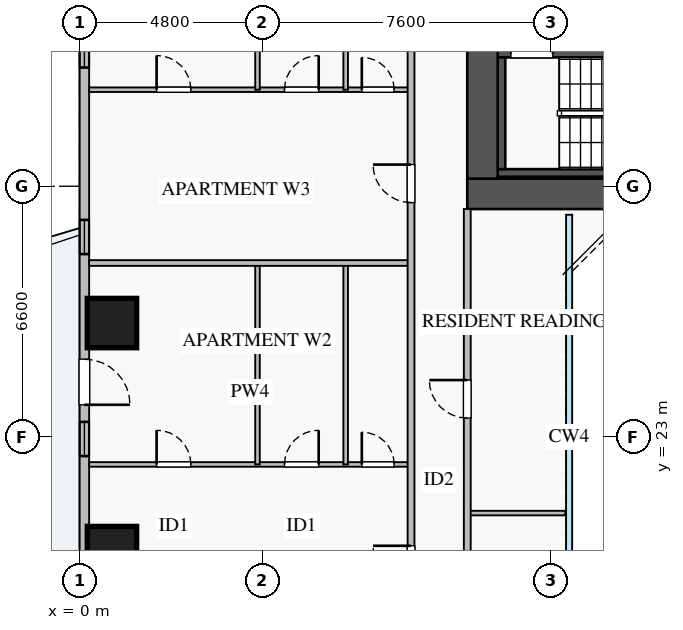
"""IFC4 building model, lengths in metres.
Left out: names, types, materials, properties, quantities, classifications, styles, units other than length and angle.
Written with IfcOpenShell. Run it as: python <this file> out.ifc"""

import sys

from ifc_helpers import new_model, si_unit, direction, frame, frame_2d, origin, origin_2d, place, context, subcontext, project, spatial, rectangle, extrude, source, transform, mapped, element, fill, save


model = new_model("IFC4")
c1 = context("Model", 3, precision=1e-05, world=origin(), true_north=direction((0.0, 1.0)))
c2 = subcontext(c1, "Body", "Model", "MODEL_VIEW")
j1 = project(units=[si_unit("LENGTHUNIT", "METRE"), si_unit("PLANEANGLEUNIT", "RADIAN")], contexts=[c1])
p1 = place(None, origin())
s1 = spatial("IfcSite", under=j1, at=p1, CompositionType="ELEMENT")
p2 = place(p1, origin())
s2 = spatial("IfcBuilding", under=s1, at=p2, CompositionType="ELEMENT")
p3 = place(p2, frame((0.0, 0.0, 39.25)))
s3 = spatial("IfcBuildingStorey", under=s2, at=p3, CompositionType="ELEMENT", Elevation=39.25)
p4 = place(p3, frame((12.68, 33.2, 0.0), z_axis=(0.0, 0.0, 1.0), x_axis=(1.0, 0.0, 0.0)))
e1 = element("IfcWall", 1, at=p4, inside=s3, PredefinedType="SHEAR", context=c2, shape_type="SweptSolid", body=[
    extrude(rectangle(XDim=1.94, YDim=0.18, at=frame_2d((0.97, 0.0))), origin(), (0.0, 0.0, 1.0), 3.07),
])
p5 = place(p3, frame((11.0, 29.95, 0.0), z_axis=(0.0, 0.0, 1.0), x_axis=(1.0, 0.0, 0.0)))
e2 = element("IfcWall", 2, at=p5, inside=s3, PredefinedType="SHEAR", context=c2, shape_type="SweptSolid", body=[
    extrude(rectangle(XDim=7.15, YDim=0.2, at=frame_2d((3.575, 0.0))), origin(), (0.0, 0.0, 1.0), 3.25),
])
p6 = place(p3, frame((11.0, 33.09, 0.0), z_axis=(0.0, 0.0, 1.0), x_axis=(1.0, 0.0, 0.0)))
e3 = element("IfcWall", 3, at=p6, inside=s3, PredefinedType="SHEAR", context=c2, shape_type="SweptSolid", body=[
    extrude(rectangle(XDim=7.15, YDim=0.2, at=frame_2d((3.575, 0.0))), origin(), (0.0, 0.0, 1.0), 3.25),
])
p7 = place(p6, frame((0.35, 0.0, 0.0)))
e4 = element("IfcOpeningElement", 4, at=p7, cuts=e3, PredefinedType="OPENING", context=c2, shape_type="SweptSolid", body=[
    extrude(rectangle(XDim=1.1, YDim=2.05, at=frame_2d((0.55, 1.025))), frame((0.0, 0.11, 0.0), z_axis=(0.0, -1.0, 0.0), x_axis=(1.0, 0.0, 0.0)), (0.0, 0.0, 1.0), 0.22),
])
p8 = place(p3, frame((11.1, 30.05, 0.0), z_axis=(0.0, 0.0, 1.0), x_axis=(0.0, 1.0, 0.0)))
e5 = element("IfcWall", 5, at=p8, inside=s3, PredefinedType="SHEAR", context=c2, shape_type="SweptSolid", body=[
    extrude(rectangle(XDim=2.94, YDim=0.2, at=frame_2d((1.47, 0.0))), origin(), (0.0, 0.0, 1.0), 3.25),
])
p9 = place(p3, frame((10.2, 29.4, 0.0), z_axis=(0.0, 0.0, 1.0), x_axis=(1.0, 0.0, 0.0)))
e6 = element("IfcWall", 6, at=p9, inside=s3, PredefinedType="SHEAR", context=c2, shape_type="SweptSolid", body=[
    extrude(rectangle(XDim=17.6, YDim=0.8, at=frame_2d((8.8, 0.0))), origin(), (0.0, 0.0, 1.0), 3.25),
])
p10 = place(p3, frame((10.6, 29.8, 0.0), z_axis=(0.0, 0.0, 1.0), x_axis=(0.0, 1.0, 0.0)))
e7 = element("IfcWall", 7, at=p10, inside=s3, PredefinedType="SHEAR", context=c2, shape_type="SweptSolid", body=[
    extrude(rectangle(XDim=5.6, YDim=0.8, at=frame_2d((2.8, 0.0))), origin(), (0.0, 0.0, 1.0), 3.25),
])
m1 = source(origin(), c2, "Body", "SweptSolid", [
    extrude(rectangle(XDim=1.3, YDim=1.3, at=origin_2d()), origin(), (0.0, 0.0, 1.0), 3.25),
])
for number, where, z_axis, x_axis in (
    (8, (0.85, 26.0, 0.0), (0.0, 0.0, 1.0), (1.0, 0.0, 0.0)),
    (9, (0.85, 20.0, 0.0), (0.0, 0.0, 1.0), (1.0, 0.0, 0.0)),
):
    element("IfcColumn", number, at=place(p3, frame(where, z_axis=z_axis, x_axis=x_axis)), inside=s3, PredefinedType="COLUMN", context=c2, shape_type="MappedRepresentation", body=[
        mapped(m1, transform((0.0, 0.0, 0.0), x_axis=(1.0, 0.0, 0.0), y_axis=(0.0, 1.0, 0.0), z_axis=(0.0, 0.0, 1.0), scale=1.0)),
    ])
p11 = place(p3, frame((0.125, 9.45, 0.0), z_axis=(0.0, 0.0, 1.0), x_axis=(0.0, 1.0, 0.0)))
e10 = element("IfcWall", 10, at=p11, inside=s3, PredefinedType="STANDARD", context=c2, shape_type="SweptSolid", body=[
    extrude(rectangle(XDim=27.1, YDim=0.25, at=frame_2d((13.55, 0.0))), origin(), (0.0, 0.0, 1.0), 2.61),
])
p12 = place(p11, frame((14.4, 0.0, 0.0)))
e11 = element("IfcOpeningElement", 11, at=p12, cuts=e10, PredefinedType="OPENING", context=c2, shape_type="SweptSolid", body=[
    extrude(rectangle(XDim=1.2, YDim=2.1, at=frame_2d((0.6, 1.05))), frame((0.0, 0.135, 0.0), z_axis=(0.0, -1.0, 0.0), x_axis=(1.0, 0.0, 0.0)), (0.0, 0.0, 1.0), 0.27),
])
p13 = place(p11, frame((2.188, 0.0, 0.9)))
e12 = element("IfcOpeningElement", 12, at=p13, cuts=e10, PredefinedType="OPENING", context=c2, shape_type="SweptSolid", body=[
    extrude(rectangle(XDim=2.4, YDim=1.48, at=frame_2d((1.2, 0.74))), frame((0.0, 0.135, 0.0), z_axis=(0.0, -1.0, 0.0), x_axis=(1.0, 0.0, 0.0)), (0.0, 0.0, 1.0), 0.27),
])
p14 = place(p11, frame((23.272, 0.0, 0.9)))
e13 = element("IfcOpeningElement", 13, at=p14, cuts=e10, PredefinedType="OPENING", context=c2, shape_type="SweptSolid", body=[
    extrude(rectangle(XDim=2.1, YDim=1.5, at=frame_2d((1.05, 0.75))), frame((0.0, 0.135, 0.0), z_axis=(0.0, -1.0, 0.0), x_axis=(1.0, 0.0, 0.0)), (0.0, 0.0, 1.0), 0.27),
])
p15 = place(p11, frame((13.05, 0.0, 0.9)))
e14 = element("IfcOpeningElement", 14, at=p15, cuts=e10, PredefinedType="OPENING", context=c2, shape_type="SweptSolid", body=[
    extrude(rectangle(XDim=0.9, YDim=1.2, at=frame_2d((0.45, 0.6))), frame((0.0, 0.135, 0.0), z_axis=(0.0, -1.0, 0.0), x_axis=(1.0, 0.0, 0.0)), (0.0, 0.0, 1.0), 0.27),
])
p16 = place(p11, frame((8.165, 0.0, 0.9)))
e15 = element("IfcOpeningElement", 15, at=p16, cuts=e10, PredefinedType="OPENING", context=c2, shape_type="SweptSolid", body=[
    extrude(rectangle(XDim=0.9, YDim=1.2, at=frame_2d((0.45, 0.6))), frame((0.0, 0.135, 0.0), z_axis=(0.0, -1.0, 0.0), x_axis=(1.0, 0.0, 0.0)), (0.0, 0.0, 1.0), 0.27),
])
p17 = place(p11, frame((18.365, 0.0, 0.9)))
e16 = element("IfcOpeningElement", 16, at=p17, cuts=e10, PredefinedType="OPENING", context=c2, shape_type="SweptSolid", body=[
    extrude(rectangle(XDim=0.9, YDim=1.2, at=frame_2d((0.45, 0.6))), frame((0.0, 0.135, 0.0), z_axis=(0.0, -1.0, 0.0), x_axis=(1.0, 0.0, 0.0)), (0.0, 0.0, 1.0), 0.27),
])
p18 = place(p3, frame((0.25, 22.28, 0.0), z_axis=(0.0, 0.0, 1.0), x_axis=(1.0, 0.0, 0.0)))
e17 = element("IfcWall", 17, at=p18, inside=s3, PredefinedType="PLUMBINGWALL", context=c2, shape_type="SweptSolid", body=[
    extrude(rectangle(XDim=8.47, YDim=0.12, at=frame_2d((4.235, 0.0))), origin(), (0.0, 0.0, 1.0), 3.07),
])
p19 = place(p18, frame((1.775, 0.0, 0.0)))
e18 = element("IfcOpeningElement", 18, at=p19, cuts=e17, PredefinedType="OPENING", context=c2, shape_type="SweptSolid", body=[
    extrude(rectangle(XDim=0.9, YDim=2.05, at=frame_2d((0.45, 1.025))), frame((0.0, 0.07, 0.0), z_axis=(0.0, -1.0, 0.0), x_axis=(1.0, 0.0, 0.0)), (0.0, 0.0, 1.0), 0.14),
])
p20 = place(p18, frame((5.14, 0.0, 0.0)))
e19 = element("IfcOpeningElement", 19, at=p20, cuts=e17, PredefinedType="OPENING", context=c2, shape_type="SweptSolid", body=[
    extrude(rectangle(XDim=0.9, YDim=2.05, at=frame_2d((0.45, 1.025))), frame((0.0, 0.07, 0.0), z_axis=(0.0, -1.0, 0.0), x_axis=(1.0, 0.0, 0.0)), (0.0, 0.0, 1.0), 0.14),
])
p21 = place(p18, frame((7.175, 0.0, 0.0)))
e20 = element("IfcOpeningElement", 20, at=p21, cuts=e17, PredefinedType="OPENING", context=c2, shape_type="SweptSolid", body=[
    extrude(rectangle(XDim=0.85, YDim=2.05, at=frame_2d((0.425, 1.025))), frame((0.0, 0.07, 0.0), z_axis=(0.0, -1.0, 0.0), x_axis=(1.0, 0.0, 0.0)), (0.0, 0.0, 1.0), 0.14),
])
for number, where, z_axis, x_axis in (
    (21, (4.68, 22.28, 0.0), (0.0, 0.0, 1.0), (0.0, 1.0, 0.0)),
    (22, (7.0, 22.28, 0.0), (0.0, 0.0, 1.0), (0.0, 1.0, 0.0)),
):
    element("IfcWall", number, at=place(p3, frame(where, z_axis=z_axis, x_axis=x_axis)), inside=s3, PredefinedType="PLUMBINGWALL", context=c2, shape_type="SweptSolid", body=[
        extrude(rectangle(XDim=5.3, YDim=0.12, at=frame_2d((2.65, 0.0))), origin(), (0.0, 0.0, 1.0), 3.07),
    ])
p22 = place(p3, frame((0.25, 32.14, 0.0), z_axis=(0.0, 0.0, 1.0), x_axis=(1.0, 0.0, 0.0)))
e23 = element("IfcWall", 23, at=p22, inside=s3, PredefinedType="PLUMBINGWALL", context=c2, shape_type="SweptSolid", body=[
    extrude(rectangle(XDim=8.47, YDim=0.12, at=frame_2d((4.235, 0.0))), origin(), (0.0, 0.0, 1.0), 3.07),
])
p23 = place(p22, frame((1.775, 0.0, 0.0)))
e24 = element("IfcOpeningElement", 24, at=p23, cuts=e23, PredefinedType="OPENING", context=c2, shape_type="SweptSolid", body=[
    extrude(rectangle(XDim=0.9, YDim=2.05, at=frame_2d((0.45, 1.025))), frame((0.0, 0.07, 0.0), z_axis=(0.0, -1.0, 0.0), x_axis=(1.0, 0.0, 0.0)), (0.0, 0.0, 1.0), 0.14),
])
p24 = place(p22, frame((5.14, 0.0, 0.0)))
e25 = element("IfcOpeningElement", 25, at=p24, cuts=e23, PredefinedType="OPENING", context=c2, shape_type="SweptSolid", body=[
    extrude(rectangle(XDim=0.9, YDim=2.05, at=frame_2d((0.45, 1.025))), frame((0.0, 0.07, 0.0), z_axis=(0.0, -1.0, 0.0), x_axis=(1.0, 0.0, 0.0)), (0.0, 0.0, 1.0), 0.14),
])
p25 = place(p22, frame((7.175, 0.0, 0.0)))
e26 = element("IfcOpeningElement", 26, at=p25, cuts=e23, PredefinedType="OPENING", context=c2, shape_type="SweptSolid", body=[
    extrude(rectangle(XDim=0.85, YDim=2.05, at=frame_2d((0.425, 1.025))), frame((0.0, 0.07, 0.0), z_axis=(0.0, -1.0, 0.0), x_axis=(1.0, 0.0, 0.0)), (0.0, 0.0, 1.0), 0.14),
])
for number, where, z_axis, x_axis in (
    (27, (4.68, 32.14, 0.0), (0.0, 0.0, 1.0), (0.0, 1.0, 0.0)),
    (28, (7.0, 32.14, 0.0), (0.0, 0.0, 1.0), (0.0, 1.0, 0.0)),
):
    element("IfcWall", number, at=place(p3, frame(where, z_axis=z_axis, x_axis=x_axis)), inside=s3, PredefinedType="PLUMBINGWALL", context=c2, shape_type="SweptSolid", body=[
        extrude(rectangle(XDim=4.94, YDim=0.12, at=frame_2d((2.47, 0.0))), origin(), (0.0, 0.0, 1.0), 3.07),
    ])
p26 = place(p3, frame((0.25, 27.58, 0.0), z_axis=(0.0, 0.0, 1.0), x_axis=(1.0, 0.0, 0.0)))
e29 = element("IfcWall", 29, at=p26, inside=s3, PredefinedType="PARTITIONING", context=c2, shape_type="SweptSolid", body=[
    extrude(rectangle(XDim=8.47, YDim=0.15, at=frame_2d((4.235, 0.0))), origin(), (0.0, 0.0, 1.0), 3.07),
])
p27 = place(p3, frame((8.72, 7.21, 0.0), z_axis=(0.0, 0.0, 1.0), x_axis=(0.0, 1.0, 0.0)))
e30 = element("IfcWall", 30, at=p27, inside=s3, PredefinedType="PARTITIONING", context=c2, shape_type="SweptSolid", body=[
    extrude(rectangle(XDim=31.23, YDim=0.18, at=frame_2d((15.615, 0.0))), origin(), (0.0, 0.0, 1.0), 3.07),
])
p28 = place(p27, frame((30.09, 0.0, 0.0)))
e31 = element("IfcOpeningElement", 31, at=p28, cuts=e30, PredefinedType="OPENING", context=c2, shape_type="SweptSolid", body=[
    extrude(rectangle(XDim=0.9, YDim=2.05, at=frame_2d((0.45, 1.025))), frame((0.0, 0.1, 0.0), z_axis=(0.0, -1.0, 0.0), x_axis=(1.0, 0.0, 0.0)), (0.0, 0.0, 1.0), 0.2),
])
p29 = place(p27, frame((0.24, 0.0, 0.0)))
e32 = element("IfcOpeningElement", 32, at=p29, cuts=e30, PredefinedType="OPENING", context=c2, shape_type="SweptSolid", body=[
    extrude(rectangle(XDim=0.9, YDim=2.05, at=frame_2d((0.45, 1.025))), frame((0.0, 0.1, 0.0), z_axis=(0.0, -1.0, 0.0), x_axis=(1.0, 0.0, 0.0)), (0.0, 0.0, 1.0), 0.2),
])
p30 = place(p27, frame((5.265, 0.0, 0.0)))
e33 = element("IfcOpeningElement", 33, at=p30, cuts=e30, PredefinedType="OPENING", context=c2, shape_type="SweptSolid", body=[
    extrude(rectangle(XDim=1.0, YDim=2.05, at=frame_2d((0.5, 1.025))), frame((0.0, 0.1, 0.0), z_axis=(0.0, -1.0, 0.0), x_axis=(1.0, 0.0, 0.0)), (0.0, 0.0, 1.0), 0.2),
])
p31 = place(p27, frame((11.93, 0.0, 0.0)))
e34 = element("IfcOpeningElement", 34, at=p31, cuts=e30, PredefinedType="OPENING", context=c2, shape_type="SweptSolid", body=[
    extrude(rectangle(XDim=1.0, YDim=2.05, at=frame_2d((0.5, 1.025))), frame((0.0, 0.1, 0.0), z_axis=(0.0, -1.0, 0.0), x_axis=(1.0, 0.0, 0.0)), (0.0, 0.0, 1.0), 0.2),
])
p32 = place(p27, frame((21.96, 0.0, 0.0)))
e35 = element("IfcOpeningElement", 35, at=p32, cuts=e30, PredefinedType="OPENING", context=c2, shape_type="SweptSolid", body=[
    extrude(rectangle(XDim=1.0, YDim=2.05, at=frame_2d((0.5, 1.025))), frame((0.0, 0.1, 0.0), z_axis=(0.0, -1.0, 0.0), x_axis=(1.0, 0.0, 0.0)), (0.0, 0.0, 1.0), 0.2),
])
p33 = place(p3, frame((10.2, 21.0, 0.0), z_axis=(0.0, 0.0, 1.0), x_axis=(1.0, 0.0, 0.0)))
e36 = element("IfcWall", 36, at=p33, inside=s3, PredefinedType="PLUMBINGWALL", context=c2, shape_type="SweptSolid", body=[
    extrude(rectangle(XDim=2.58, YDim=0.12, at=frame_2d((1.29, 0.0))), origin(), (0.0, 0.0, 1.0), 3.07),
])
p34 = place(p3, frame((10.2, 17.0, 0.0), z_axis=(0.0, 0.0, 1.0), x_axis=(0.0, 1.0, 0.0)))
e37 = element("IfcWall", 37, at=p34, inside=s3, PredefinedType="PARTITIONING", context=c2, shape_type="SweptSolid", body=[
    extrude(rectangle(XDim=12.0, YDim=0.18, at=frame_2d((6.0, 0.0))), origin(), (0.0, 0.0, 1.0), 3.07),
])
p35 = place(p34, frame((1.5, 0.0, 0.0)))
e38 = element("IfcOpeningElement", 38, at=p35, cuts=e37, PredefinedType="OPENING", context=c2, shape_type="SweptSolid", body=[
    extrude(rectangle(XDim=0.85, YDim=2.05, at=frame_2d((0.425, 1.025))), frame((0.0, 0.1, 0.0), z_axis=(0.0, -1.0, 0.0), x_axis=(1.0, 0.0, 0.0)), (0.0, 0.0, 1.0), 0.2),
])
p36 = place(p34, frame((6.5, 0.0, 0.0)))
e39 = element("IfcOpeningElement", 39, at=p36, cuts=e37, PredefinedType="OPENING", context=c2, shape_type="SweptSolid", body=[
    extrude(rectangle(XDim=1.0, YDim=2.05, at=frame_2d((0.5, 1.025))), frame((0.0, 0.1, 0.0), z_axis=(0.0, -1.0, 0.0), x_axis=(1.0, 0.0, 0.0)), (0.0, 0.0, 1.0), 0.2),
])
m2 = source(origin(), c2, "Body", "SweptSolid", [
    extrude(rectangle(XDim=1.2, YDim=2.1, at=frame_2d((0.6, 1.05))), frame((0.0, 0.025, 0.0), z_axis=(0.0, -1.0, 0.0), x_axis=(1.0, 0.0, 0.0)), (0.0, 0.0, 1.0), 0.05),
])
p37 = place(p12, frame((1.2, 0.0, 0.0), z_axis=(0.0, 0.0, 1.0), x_axis=(-1.0, 0.0, 0.0)))
e40 = element("IfcDoor", 40, at=p37, inside=s3, OperationType="SINGLE_SWING_LEFT", PredefinedType="DOOR", context=c2, shape_type="MappedRepresentation", body=[
    mapped(m2, transform((0.0, 0.0, 0.0), x_axis=(1.0, 0.0, 0.0), y_axis=(0.0, 1.0, 0.0), z_axis=(0.0, 0.0, 1.0), scale=1.0)),
])
fill(e11, e40)
m3 = source(origin(), c2, "Body", "SweptSolid", [
    extrude(rectangle(XDim=2.1, YDim=1.5, at=frame_2d((1.05, 0.75))), frame((0.0, 0.03, 0.0), z_axis=(0.0, -1.0, 0.0), x_axis=(1.0, 0.0, 0.0)), (0.0, 0.0, 1.0), 0.06),
])
p38 = place(p14, origin())
e41 = element("IfcWindow", 41, at=p38, inside=s3, PartitioningType="TRIPLE_PANEL_VERTICAL", PredefinedType="WINDOW", context=c2, shape_type="MappedRepresentation", body=[
    mapped(m3, transform((0.0, 0.0, 0.0), x_axis=(1.0, 0.0, 0.0), y_axis=(0.0, 1.0, 0.0), z_axis=(0.0, 0.0, 1.0), scale=1.0)),
])
fill(e13, e41)
m4 = source(origin(), c2, "Body", "SweptSolid", [
    extrude(rectangle(XDim=1.1, YDim=2.05, at=frame_2d((0.55, 1.025))), frame((0.0, 0.025, 0.0), z_axis=(0.0, -1.0, 0.0), x_axis=(1.0, 0.0, 0.0)), (0.0, 0.0, 1.0), 0.05),
])
p39 = place(p7, origin())
e42 = element("IfcDoor", 42, at=p39, inside=s3, OperationType="SINGLE_SWING_RIGHT", PredefinedType="DOOR", context=c2, shape_type="MappedRepresentation", body=[
    mapped(m4, transform((0.0, 0.0, 0.0), x_axis=(1.0, 0.0, 0.0), y_axis=(0.0, 1.0, 0.0), z_axis=(0.0, 0.0, 1.0), scale=1.0)),
])
fill(e4, e42)
m5 = source(origin(), c2, "Body", "SweptSolid", [
    extrude(rectangle(XDim=0.9, YDim=2.05, at=frame_2d((0.45, 1.025))), frame((0.0, 0.025, 0.0), z_axis=(0.0, -1.0, 0.0), x_axis=(1.0, 0.0, 0.0)), (0.0, 0.0, 1.0), 0.05),
])
p40 = place(p19, origin())
e43 = element("IfcDoor", 43, at=p40, inside=s3, OperationType="SINGLE_SWING_LEFT", PredefinedType="DOOR", context=c2, shape_type="MappedRepresentation", body=[
    mapped(m5, transform((0.0, 0.0, 0.0), x_axis=(1.0, 0.0, 0.0), y_axis=(0.0, 1.0, 0.0), z_axis=(0.0, 0.0, 1.0), scale=1.0)),
])
fill(e18, e43)
p41 = place(p20, origin())
e44 = element("IfcDoor", 44, at=p41, inside=s3, OperationType="SINGLE_SWING_RIGHT", PredefinedType="DOOR", context=c2, shape_type="MappedRepresentation", body=[
    mapped(m5, transform((0.0, 0.0, 0.0), x_axis=(1.0, 0.0, 0.0), y_axis=(0.0, 1.0, 0.0), z_axis=(0.0, 0.0, 1.0), scale=1.0)),
])
fill(e19, e44)
m6 = source(origin(), c2, "Body", "SweptSolid", [
    extrude(rectangle(XDim=0.85, YDim=2.05, at=frame_2d((0.425, 1.025))), frame((0.0, 0.025, 0.0), z_axis=(0.0, -1.0, 0.0), x_axis=(1.0, 0.0, 0.0)), (0.0, 0.0, 1.0), 0.05),
])
p42 = place(p21, origin())
e45 = element("IfcDoor", 45, at=p42, inside=s3, OperationType="SINGLE_SWING_LEFT", PredefinedType="DOOR", context=c2, shape_type="MappedRepresentation", body=[
    mapped(m6, transform((0.0, 0.0, 0.0), x_axis=(1.0, 0.0, 0.0), y_axis=(0.0, 1.0, 0.0), z_axis=(0.0, 0.0, 1.0), scale=1.0)),
])
fill(e20, e45)
p43 = place(p23, origin())
e46 = element("IfcDoor", 46, at=p43, inside=s3, OperationType="SINGLE_SWING_LEFT", PredefinedType="DOOR", context=c2, shape_type="MappedRepresentation", body=[
    mapped(m5, transform((0.0, 0.0, 0.0), x_axis=(1.0, 0.0, 0.0), y_axis=(0.0, 1.0, 0.0), z_axis=(0.0, 0.0, 1.0), scale=1.0)),
])
fill(e24, e46)
p44 = place(p24, origin())
e47 = element("IfcDoor", 47, at=p44, inside=s3, OperationType="SINGLE_SWING_RIGHT", PredefinedType="DOOR", context=c2, shape_type="MappedRepresentation", body=[
    mapped(m5, transform((0.0, 0.0, 0.0), x_axis=(1.0, 0.0, 0.0), y_axis=(0.0, 1.0, 0.0), z_axis=(0.0, 0.0, 1.0), scale=1.0)),
])
fill(e25, e47)
p45 = place(p25, origin())
e48 = element("IfcDoor", 48, at=p45, inside=s3, OperationType="SINGLE_SWING_LEFT", PredefinedType="DOOR", context=c2, shape_type="MappedRepresentation", body=[
    mapped(m6, transform((0.0, 0.0, 0.0), x_axis=(1.0, 0.0, 0.0), y_axis=(0.0, 1.0, 0.0), z_axis=(0.0, 0.0, 1.0), scale=1.0)),
])
fill(e26, e48)
m7 = source(origin(), c2, "Body", "SweptSolid", [
    extrude(rectangle(XDim=1.0, YDim=2.05, at=frame_2d((0.5, 1.025))), frame((0.0, 0.025, 0.0), z_axis=(0.0, -1.0, 0.0), x_axis=(1.0, 0.0, 0.0)), (0.0, 0.0, 1.0), 0.05),
])
p46 = place(p31, origin())
e49 = element("IfcDoor", 49, at=p46, inside=s3, OperationType="SINGLE_SWING_RIGHT", PredefinedType="DOOR", context=c2, shape_type="MappedRepresentation", body=[
    mapped(m7, transform((0.0, 0.0, 0.0), x_axis=(1.0, 0.0, 0.0), y_axis=(0.0, 1.0, 0.0), z_axis=(0.0, 0.0, 1.0), scale=1.0)),
])
fill(e34, e49)
p47 = place(p32, origin())
e50 = element("IfcDoor", 50, at=p47, inside=s3, OperationType="SINGLE_SWING_RIGHT", PredefinedType="DOOR", context=c2, shape_type="MappedRepresentation", body=[
    mapped(m7, transform((0.0, 0.0, 0.0), x_axis=(1.0, 0.0, 0.0), y_axis=(0.0, 1.0, 0.0), z_axis=(0.0, 0.0, 1.0), scale=1.0)),
])
fill(e35, e50)
p48 = place(p36, origin())
e51 = element("IfcDoor", 51, at=p48, inside=s3, OperationType="SINGLE_SWING_RIGHT", PredefinedType="DOOR", context=c2, shape_type="MappedRepresentation", body=[
    mapped(m7, transform((0.0, 0.0, 0.0), x_axis=(1.0, 0.0, 0.0), y_axis=(0.0, 1.0, 0.0), z_axis=(0.0, 0.0, 1.0), scale=1.0)),
])
fill(e39, e51)
m8 = source(origin(), c2, "Body", "SweptSolid", [
    extrude(rectangle(XDim=0.9, YDim=1.2, at=frame_2d((0.45, 0.6))), frame((0.0, 0.03, 0.0), z_axis=(0.0, -1.0, 0.0), x_axis=(1.0, 0.0, 0.0)), (0.0, 0.0, 1.0), 0.06),
])
p49 = place(p15, origin())
e52 = element("IfcWindow", 52, at=p49, inside=s3, PartitioningType="SINGLE_PANEL", PredefinedType="WINDOW", context=c2, shape_type="MappedRepresentation", body=[
    mapped(m8, transform((0.0, 0.0, 0.0), x_axis=(1.0, 0.0, 0.0), y_axis=(0.0, 1.0, 0.0), z_axis=(0.0, 0.0, 1.0), scale=1.0)),
])
fill(e14, e52)
p50 = place(p17, origin())
e53 = element("IfcWindow", 53, at=p50, inside=s3, PartitioningType="SINGLE_PANEL", PredefinedType="WINDOW", context=c2, shape_type="MappedRepresentation", body=[
    mapped(m8, transform((0.0, 0.0, 0.0), x_axis=(1.0, 0.0, 0.0), y_axis=(0.0, 1.0, 0.0), z_axis=(0.0, 0.0, 1.0), scale=1.0)),
])
fill(e16, e53)
save(model, sys.argv[1])
